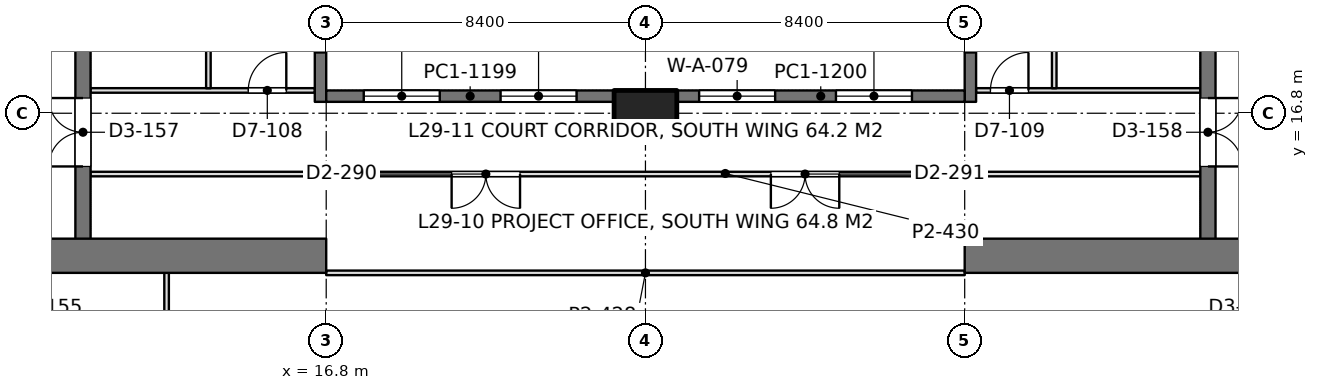
"""IFC4 building model, lengths in metres.
Left out: names, types, materials, properties, quantities, classifications, styles, units other than length and angle.
Written with IfcOpenShell. Run it as: python <this file> out.ifc"""

import sys

from ifc_helpers import new_model, si_unit, direction, frame, frame_2d, origin, origin_2d, place, context, subcontext, project, spatial, rectangle, extrude, element, fill, save


model = new_model("IFC4")
c1 = context("Model", 3, precision=1e-05, world=origin(), true_north=direction((0.0, 1.0)))
c2 = subcontext(c1, "Body", "Model", "MODEL_VIEW")
j1 = project(units=[si_unit("LENGTHUNIT", "METRE"), si_unit("PLANEANGLEUNIT", "RADIAN")], contexts=[c1])
p1 = place(None, origin())
s1 = spatial("IfcSite", under=j1, at=p1, CompositionType="ELEMENT")
p2 = place(p1, origin())
s2 = spatial("IfcBuilding", under=s1, at=p2, CompositionType="ELEMENT")
p3 = place(p2, frame((0.0, 0.0, 130.2)))
s3 = spatial("IfcBuildingStorey", under=s2, at=p3, CompositionType="ELEMENT", Elevation=130.2)
p4 = place(p3, frame((25.2, 16.8, 0.0), z_axis=(0.0, 0.0, 1.0), x_axis=(1.0, 0.0, 0.0)))
e1 = element("IfcColumn", 1, at=p4, inside=s3, PredefinedType="COLUMN", context=c2, shape_type="SweptSolid", body=[
    extrude(rectangle(XDim=1.65, YDim=1.2, at=origin_2d()), origin(), (0.0, 0.0, 1.0), 4.2),
])
p5 = place(p3, frame((-1.2, 13.05, 0.0), z_axis=(0.0, 0.0, 1.0), x_axis=(1.0, 0.0, 0.0)))
e2 = element("IfcWall", 2, at=p5, inside=s3, PredefinedType="SHEAR", context=c2, shape_type="SweptSolid", body=[
    extrude(rectangle(XDim=18.0, YDim=0.9, at=frame_2d((9.0, 0.0))), origin(), (0.0, 0.0, 1.0), 4.2),
])
p6 = place(p5, frame((8.95, 0.0, 0.0)))
e3 = element("IfcOpeningElement", 3, at=p6, cuts=e2, PredefinedType="OPENING", context=c2, shape_type="SweptSolid", body=[
    extrude(rectangle(XDim=1.8, YDim=2.4, at=frame_2d((0.9, 1.2))), frame((0.0, 0.46, 0.0), z_axis=(0.0, -1.0, 0.0), x_axis=(1.0, 0.0, 0.0)), (0.0, 0.0, 1.0), 0.92),
])
p7 = place(p3, frame((10.4, 13.05, 0.0), z_axis=(0.0, 0.0, 1.0), x_axis=(0.0, 1.0, 0.0)))
e4 = element("IfcWall", 4, at=p7, inside=s3, PredefinedType="SHEAR", context=c2, shape_type="SweptSolid", body=[
    extrude(rectangle(XDim=24.3, YDim=0.4, at=frame_2d((12.15, 0.0))), origin(), (0.0, 0.0, 1.0), 4.2),
])
p8 = place(p7, frame((10.05, 0.0, 0.0)))
e5 = element("IfcOpeningElement", 5, at=p8, cuts=e4, PredefinedType="OPENING", context=c2, shape_type="SweptSolid", body=[
    extrude(rectangle(XDim=1.1, YDim=2.2, at=frame_2d((0.55, 1.1))), frame((0.0, 0.21, 0.0), z_axis=(0.0, -1.0, 0.0), x_axis=(1.0, 0.0, 0.0)), (0.0, 0.0, 1.0), 0.42),
])
p9 = place(p7, frame((12.9, 0.0, 0.0)))
e6 = element("IfcOpeningElement", 6, at=p9, cuts=e4, PredefinedType="OPENING", context=c2, shape_type="SweptSolid", body=[
    extrude(rectangle(XDim=1.1, YDim=2.2, at=frame_2d((0.55, 1.1))), frame((0.0, 0.21, 0.0), z_axis=(0.0, -1.0, 0.0), x_axis=(1.0, 0.0, 0.0)), (0.0, 0.0, 1.0), 0.42),
])
p10 = place(p7, frame((21.45, 0.0, 0.0)))
e7 = element("IfcOpeningElement", 7, at=p10, cuts=e4, PredefinedType="OPENING", context=c2, shape_type="SweptSolid", body=[
    extrude(rectangle(XDim=1.1, YDim=2.2, at=frame_2d((0.55, 1.1))), frame((0.0, 0.21, 0.0), z_axis=(0.0, -1.0, 0.0), x_axis=(1.0, 0.0, 0.0)), (0.0, 0.0, 1.0), 0.42),
])
p11 = place(p7, frame((2.35, 0.0, 0.0)))
e8 = element("IfcOpeningElement", 8, at=p11, cuts=e4, PredefinedType="OPENING", context=c2, shape_type="SweptSolid", body=[
    extrude(rectangle(XDim=1.8, YDim=2.4, at=frame_2d((0.9, 1.2))), frame((0.0, 0.21, 0.0), z_axis=(0.0, -1.0, 0.0), x_axis=(1.0, 0.0, 0.0)), (0.0, 0.0, 1.0), 0.42),
])
p12 = place(p7, frame((5.8, 0.0, 0.0)))
e9 = element("IfcOpeningElement", 9, at=p12, cuts=e4, PredefinedType="OPENING", context=c2, shape_type="SweptSolid", body=[
    extrude(rectangle(XDim=1.8, YDim=2.4, at=frame_2d((0.9, 1.2))), frame((0.0, 0.21, 0.0), z_axis=(0.0, -1.0, 0.0), x_axis=(1.0, 0.0, 0.0)), (0.0, 0.0, 1.0), 0.42),
])
p13 = place(p3, frame((33.6, 13.05, 0.0), z_axis=(0.0, 0.0, 1.0), x_axis=(1.0, 0.0, 0.0)))
e10 = element("IfcWall", 10, at=p13, inside=s3, PredefinedType="SHEAR", context=c2, shape_type="SweptSolid", body=[
    extrude(rectangle(XDim=18.0, YDim=0.9, at=frame_2d((9.0, 0.0))), origin(), (0.0, 0.0, 1.0), 4.2),
])
p14 = place(p13, frame((7.25, 0.0, 0.0)))
e11 = element("IfcOpeningElement", 11, at=p14, cuts=e10, PredefinedType="OPENING", context=c2, shape_type="SweptSolid", body=[
    extrude(rectangle(XDim=1.8, YDim=2.4, at=frame_2d((0.9, 1.2))), frame((0.0, 0.46, 0.0), z_axis=(0.0, -1.0, 0.0), x_axis=(1.0, 0.0, 0.0)), (0.0, 0.0, 1.0), 0.92),
])
p15 = place(p3, frame((40.0, 13.05, 0.0), z_axis=(0.0, 0.0, 1.0), x_axis=(0.0, 1.0, 0.0)))
e12 = element("IfcWall", 12, at=p15, inside=s3, PredefinedType="SHEAR", context=c2, shape_type="SweptSolid", body=[
    extrude(rectangle(XDim=24.3, YDim=0.4, at=frame_2d((12.15, 0.0))), origin(), (0.0, 0.0, 1.0), 4.2),
])
p16 = place(p15, frame((10.05, 0.0, 0.0)))
e13 = element("IfcOpeningElement", 13, at=p16, cuts=e12, PredefinedType="OPENING", context=c2, shape_type="SweptSolid", body=[
    extrude(rectangle(XDim=1.1, YDim=2.2, at=frame_2d((0.55, 1.1))), frame((0.0, 0.21, 0.0), z_axis=(0.0, -1.0, 0.0), x_axis=(1.0, 0.0, 0.0)), (0.0, 0.0, 1.0), 0.42),
])
p17 = place(p15, frame((12.9, 0.0, 0.0)))
e14 = element("IfcOpeningElement", 14, at=p17, cuts=e12, PredefinedType="OPENING", context=c2, shape_type="SweptSolid", body=[
    extrude(rectangle(XDim=1.1, YDim=2.2, at=frame_2d((0.55, 1.1))), frame((0.0, 0.21, 0.0), z_axis=(0.0, -1.0, 0.0), x_axis=(1.0, 0.0, 0.0)), (0.0, 0.0, 1.0), 0.42),
])
p18 = place(p15, frame((21.45, 0.0, 0.0)))
e15 = element("IfcOpeningElement", 15, at=p18, cuts=e12, PredefinedType="OPENING", context=c2, shape_type="SweptSolid", body=[
    extrude(rectangle(XDim=1.1, YDim=2.2, at=frame_2d((0.55, 1.1))), frame((0.0, 0.21, 0.0), z_axis=(0.0, -1.0, 0.0), x_axis=(1.0, 0.0, 0.0)), (0.0, 0.0, 1.0), 0.42),
])
p19 = place(p15, frame((2.35, 0.0, 0.0)))
e16 = element("IfcOpeningElement", 16, at=p19, cuts=e12, PredefinedType="OPENING", context=c2, shape_type="SweptSolid", body=[
    extrude(rectangle(XDim=1.8, YDim=2.4, at=frame_2d((0.9, 1.2))), frame((0.0, 0.21, 0.0), z_axis=(0.0, -1.0, 0.0), x_axis=(1.0, 0.0, 0.0)), (0.0, 0.0, 1.0), 0.42),
])
p20 = place(p15, frame((5.8, 0.0, 0.0)))
e17 = element("IfcOpeningElement", 17, at=p20, cuts=e12, PredefinedType="OPENING", context=c2, shape_type="SweptSolid", body=[
    extrude(rectangle(XDim=1.8, YDim=2.4, at=frame_2d((0.9, 1.2))), frame((0.0, 0.21, 0.0), z_axis=(0.0, -1.0, 0.0), x_axis=(1.0, 0.0, 0.0)), (0.0, 0.0, 1.0), 0.42),
])
p21 = place(p3, frame((16.65, 17.1, 0.0), z_axis=(0.0, 0.0, 1.0), x_axis=(0.0, 1.0, 0.0)))
e18 = element("IfcWall", 18, at=p21, inside=s3, PredefinedType="SOLIDWALL", context=c2, shape_type="SweptSolid", body=[
    extrude(rectangle(XDim=5.0, YDim=0.3, at=frame_2d((2.5, 0.0))), origin(), (0.0, 0.0, 1.0), 4.05),
])
p22 = place(p21, frame((1.3, 0.0, 0.1)))
e19 = element("IfcOpeningElement", 19, at=p22, cuts=e18, PredefinedType="OPENING", context=c2, shape_type="SweptSolid", body=[
    extrude(rectangle(XDim=2.0, YDim=3.0, at=frame_2d((1.0, 1.5))), frame((0.0, 0.16, 0.0), z_axis=(0.0, -1.0, 0.0), x_axis=(1.0, 0.0, 0.0)), (0.0, 0.0, 1.0), 0.32),
])
p23 = place(p3, frame((33.75, 17.1, 0.0), z_axis=(0.0, 0.0, 1.0), x_axis=(0.0, 1.0, 0.0)))
e20 = element("IfcWall", 20, at=p23, inside=s3, PredefinedType="SOLIDWALL", context=c2, shape_type="SweptSolid", body=[
    extrude(rectangle(XDim=5.0, YDim=0.3, at=frame_2d((2.5, 0.0))), origin(), (0.0, 0.0, 1.0), 4.05),
])
p24 = place(p23, frame((1.3, 0.0, 0.1)))
e21 = element("IfcOpeningElement", 21, at=p24, cuts=e20, PredefinedType="OPENING", context=c2, shape_type="SweptSolid", body=[
    extrude(rectangle(XDim=2.0, YDim=3.0, at=frame_2d((1.0, 1.5))), frame((0.0, 0.16, 0.0), z_axis=(0.0, -1.0, 0.0), x_axis=(1.0, 0.0, 0.0)), (0.0, 0.0, 1.0), 0.32),
])
p25 = place(p3, frame((16.8, 17.25, 0.0), z_axis=(0.0, 0.0, 1.0), x_axis=(1.0, 0.0, 0.0)))
e22 = element("IfcWall", 22, at=p25, inside=s3, PredefinedType="SOLIDWALL", context=c2, shape_type="SweptSolid", body=[
    extrude(rectangle(XDim=7.575, YDim=0.3, at=frame_2d((3.788, 0.0))), origin(), (0.0, 0.0, 1.0), 4.05),
])
p26 = place(p25, frame((0.988, 0.0, 0.1)))
e23 = element("IfcOpeningElement", 23, at=p26, cuts=e22, PredefinedType="OPENING", context=c2, shape_type="SweptSolid", body=[
    extrude(rectangle(XDim=2.0, YDim=3.0, at=frame_2d((1.0, 1.5))), frame((0.0, 0.16, 0.0), z_axis=(0.0, -1.0, 0.0), x_axis=(1.0, 0.0, 0.0)), (0.0, 0.0, 1.0), 0.32),
])
p27 = place(p25, frame((4.587, 0.0, 0.1)))
e24 = element("IfcOpeningElement", 24, at=p27, cuts=e22, PredefinedType="OPENING", context=c2, shape_type="SweptSolid", body=[
    extrude(rectangle(XDim=2.0, YDim=3.0, at=frame_2d((1.0, 1.5))), frame((0.0, 0.16, 0.0), z_axis=(0.0, -1.0, 0.0), x_axis=(1.0, 0.0, 0.0)), (0.0, 0.0, 1.0), 0.32),
])
p28 = place(p3, frame((26.025, 17.25, 0.0), z_axis=(0.0, 0.0, 1.0), x_axis=(1.0, 0.0, 0.0)))
e25 = element("IfcWall", 25, at=p28, inside=s3, PredefinedType="SOLIDWALL", context=c2, shape_type="SweptSolid", body=[
    extrude(rectangle(XDim=7.575, YDim=0.3, at=frame_2d((3.788, 0.0))), origin(), (0.0, 0.0, 1.0), 4.05),
])
p29 = place(p28, frame((0.587, 0.0, 0.1)))
e26 = element("IfcOpeningElement", 26, at=p29, cuts=e25, PredefinedType="OPENING", context=c2, shape_type="SweptSolid", body=[
    extrude(rectangle(XDim=2.0, YDim=3.0, at=frame_2d((1.0, 1.5))), frame((0.0, 0.16, 0.0), z_axis=(0.0, -1.0, 0.0), x_axis=(1.0, 0.0, 0.0)), (0.0, 0.0, 1.0), 0.32),
])
p30 = place(p28, frame((4.188, 0.0, 0.1)))
e27 = element("IfcOpeningElement", 27, at=p30, cuts=e25, PredefinedType="OPENING", context=c2, shape_type="SweptSolid", body=[
    extrude(rectangle(XDim=2.0, YDim=3.0, at=frame_2d((1.0, 1.5))), frame((0.0, 0.16, 0.0), z_axis=(0.0, -1.0, 0.0), x_axis=(1.0, 0.0, 0.0)), (0.0, 0.0, 1.0), 0.32),
])
p31 = place(p3, frame((10.598, 17.4, 0.0), z_axis=(0.0, 0.0, 1.0), x_axis=(1.0, 0.0, 0.0)))
e28 = element("IfcWall", 28, at=p31, inside=s3, PredefinedType="PARTITIONING", context=c2, shape_type="SweptSolid", body=[
    extrude(rectangle(XDim=5.904, YDim=0.12, at=frame_2d((2.952, 0.0))), origin(), (0.0, 0.0, 1.0), 3.55),
])
p32 = place(p31, frame((4.152, 0.0, 0.0)))
e29 = element("IfcOpeningElement", 29, at=p32, cuts=e28, PredefinedType="OPENING", context=c2, shape_type="SweptSolid", body=[
    extrude(rectangle(XDim=1.0, YDim=2.4, at=frame_2d((0.5, 1.2))), frame((0.0, 0.07, 0.0), z_axis=(0.0, -1.0, 0.0), x_axis=(1.0, 0.0, 0.0)), (0.0, 0.0, 1.0), 0.14),
])
p33 = place(p3, frame((13.7, 17.458, 0.0), z_axis=(0.0, 0.0, 1.0), x_axis=(0.0, 1.0, 0.0)))
e30 = element("IfcWall", 30, at=p33, inside=s3, PredefinedType="PARTITIONING", context=c2, shape_type="SweptSolid", body=[
    extrude(rectangle(XDim=4.644, YDim=0.12, at=frame_2d((2.322, 0.0))), origin(), (0.0, 0.0, 1.0), 3.6),
])
p34 = place(p3, frame((33.898, 17.4, 0.0), z_axis=(0.0, 0.0, 1.0), x_axis=(1.0, 0.0, 0.0)))
e31 = element("IfcWall", 31, at=p34, inside=s3, PredefinedType="PARTITIONING", context=c2, shape_type="SweptSolid", body=[
    extrude(rectangle(XDim=5.904, YDim=0.12, at=frame_2d((2.952, 0.0))), origin(), (0.0, 0.0, 1.0), 3.55),
])
p35 = place(p34, frame((0.38, 0.0, 0.0)))
e32 = element("IfcOpeningElement", 32, at=p35, cuts=e31, PredefinedType="OPENING", context=c2, shape_type="SweptSolid", body=[
    extrude(rectangle(XDim=1.0, YDim=2.4, at=frame_2d((0.5, 1.2))), frame((0.0, 0.07, 0.0), z_axis=(0.0, -1.0, 0.0), x_axis=(1.0, 0.0, 0.0)), (0.0, 0.0, 1.0), 0.14),
])
p36 = place(p3, frame((35.956, 17.458, 0.0), z_axis=(0.0, 0.0, 1.0), x_axis=(0.0, 1.0, 0.0)))
e33 = element("IfcWall", 33, at=p36, inside=s3, PredefinedType="PARTITIONING", context=c2, shape_type="SweptSolid", body=[
    extrude(rectangle(XDim=4.644, YDim=0.12, at=frame_2d((2.322, 0.0))), origin(), (0.0, 0.0, 1.0), 3.6),
])
p37 = place(p3, frame((12.6, 1.898, 0.0), z_axis=(0.0, 0.0, 1.0), x_axis=(0.0, 1.0, 0.0)))
e34 = element("IfcWall", 34, at=p37, inside=s3, PredefinedType="PARTITIONING", context=c2, shape_type="SweptSolid", body=[
    extrude(rectangle(XDim=10.704, YDim=0.12, at=frame_2d((5.352, 0.0))), origin(), (0.0, 0.0, 1.0), 3.55),
])
for number, where, z_axis, x_axis in (
    (35, (10.598, 15.2, 0.0), (0.0, 0.0, 1.0), (1.0, 0.0, 0.0)),
    (36, (33.598, 15.2, 0.0), (0.0, 0.0, 1.0), (1.0, 0.0, 0.0)),
):
    element("IfcWall", number, at=place(p3, frame(where, z_axis=z_axis, x_axis=x_axis)), inside=s3, PredefinedType="PARTITIONING", context=c2, shape_type="SweptSolid", body=[
        extrude(rectangle(XDim=6.204, YDim=0.12, at=frame_2d((3.102, 0.0))), origin(), (0.0, 0.0, 1.0), 3.55),
    ])
p38 = place(p3, frame((16.798, 15.2, 0.0), z_axis=(0.0, 0.0, 1.0), x_axis=(1.0, 0.0, 0.0)))
e37 = element("IfcWall", 37, at=p38, inside=s3, PredefinedType="PARTITIONING", context=c2, shape_type="SweptSolid", body=[
    extrude(rectangle(XDim=16.804, YDim=0.12, at=frame_2d((8.402, 0.0))), origin(), (0.0, 0.0, 1.0), 3.55),
])
p39 = place(p38, frame((3.302, 0.0, 0.0)))
e38 = element("IfcOpeningElement", 38, at=p39, cuts=e37, PredefinedType="OPENING", context=c2, shape_type="SweptSolid", body=[
    extrude(rectangle(XDim=1.8, YDim=2.2, at=frame_2d((0.9, 1.1))), frame((0.0, 0.07, 0.0), z_axis=(0.0, -1.0, 0.0), x_axis=(1.0, 0.0, 0.0)), (0.0, 0.0, 1.0), 0.14),
])
p40 = place(p38, frame((11.702, 0.0, 0.0)))
e39 = element("IfcOpeningElement", 39, at=p40, cuts=e37, PredefinedType="OPENING", context=c2, shape_type="SweptSolid", body=[
    extrude(rectangle(XDim=1.8, YDim=2.2, at=frame_2d((0.9, 1.1))), frame((0.0, 0.07, 0.0), z_axis=(0.0, -1.0, 0.0), x_axis=(1.0, 0.0, 0.0)), (0.0, 0.0, 1.0), 0.14),
])
p41 = place(p3, frame((16.8, 12.6, 0.0), z_axis=(0.0, 0.0, 1.0), x_axis=(1.0, 0.0, 0.0)))
e40 = element("IfcWall", 40, at=p41, inside=s3, PredefinedType="PARTITIONING", context=c2, shape_type="SweptSolid", body=[
    extrude(rectangle(XDim=16.8, YDim=0.12, at=frame_2d((8.4, 0.0))), origin(), (0.0, 0.0, 1.0), 3.55),
])
p42 = place(p26, origin())
e41 = element("IfcWindow", 41, at=p42, inside=s3, PartitioningType="SINGLE_PANEL", PredefinedType="WINDOW", context=c2, shape_type="SweptSolid", body=[
    extrude(rectangle(XDim=2.0, YDim=3.0, at=frame_2d((1.0, 1.5))), frame((0.0, 0.03, 0.0), z_axis=(0.0, -1.0, 0.0), x_axis=(1.0, 0.0, 0.0)), (0.0, 0.0, 1.0), 0.06),
])
fill(e23, e41)
p43 = place(p27, origin())
e42 = element("IfcWindow", 42, at=p43, inside=s3, PartitioningType="SINGLE_PANEL", PredefinedType="WINDOW", context=c2, shape_type="SweptSolid", body=[
    extrude(rectangle(XDim=2.0, YDim=3.0, at=frame_2d((1.0, 1.5))), frame((0.0, 0.03, 0.0), z_axis=(0.0, -1.0, 0.0), x_axis=(1.0, 0.0, 0.0)), (0.0, 0.0, 1.0), 0.06),
])
fill(e24, e42)
p44 = place(p29, origin())
e43 = element("IfcWindow", 43, at=p44, inside=s3, PartitioningType="SINGLE_PANEL", PredefinedType="WINDOW", context=c2, shape_type="SweptSolid", body=[
    extrude(rectangle(XDim=2.0, YDim=3.0, at=frame_2d((1.0, 1.5))), frame((0.0, 0.03, 0.0), z_axis=(0.0, -1.0, 0.0), x_axis=(1.0, 0.0, 0.0)), (0.0, 0.0, 1.0), 0.06),
])
fill(e26, e43)
p45 = place(p30, origin())
e44 = element("IfcWindow", 44, at=p45, inside=s3, PartitioningType="SINGLE_PANEL", PredefinedType="WINDOW", context=c2, shape_type="SweptSolid", body=[
    extrude(rectangle(XDim=2.0, YDim=3.0, at=frame_2d((1.0, 1.5))), frame((0.0, 0.03, 0.0), z_axis=(0.0, -1.0, 0.0), x_axis=(1.0, 0.0, 0.0)), (0.0, 0.0, 1.0), 0.06),
])
fill(e27, e44)
p46 = place(p11, origin())
e45 = element("IfcDoor", 45, at=p46, inside=s3, OperationType="DOUBLE_DOOR_SINGLE_SWING", PredefinedType="DOOR", context=c2, shape_type="SweptSolid", body=[
    extrude(rectangle(XDim=1.8, YDim=2.4, at=frame_2d((0.9, 1.2))), frame((0.0, 0.025, 0.0), z_axis=(0.0, -1.0, 0.0), x_axis=(1.0, 0.0, 0.0)), (0.0, 0.0, 1.0), 0.05),
])
fill(e8, e45)
p47 = place(p19, frame((1.8, 0.0, 0.0), z_axis=(0.0, 0.0, 1.0), x_axis=(-1.0, 0.0, 0.0)))
e46 = element("IfcDoor", 46, at=p47, inside=s3, OperationType="DOUBLE_DOOR_SINGLE_SWING", PredefinedType="DOOR", context=c2, shape_type="SweptSolid", body=[
    extrude(rectangle(XDim=1.8, YDim=2.4, at=frame_2d((0.9, 1.2))), frame((0.0, 0.025, 0.0), z_axis=(0.0, -1.0, 0.0), x_axis=(1.0, 0.0, 0.0)), (0.0, 0.0, 1.0), 0.05),
])
fill(e16, e46)
p48 = place(p32, origin())
e47 = element("IfcDoor", 47, at=p48, inside=s3, OperationType="SINGLE_SWING_RIGHT", PredefinedType="DOOR", context=c2, shape_type="SweptSolid", body=[
    extrude(rectangle(XDim=1.0, YDim=2.4, at=frame_2d((0.5, 1.2))), frame((0.0, 0.025, 0.0), z_axis=(0.0, -1.0, 0.0), x_axis=(1.0, 0.0, 0.0)), (0.0, 0.0, 1.0), 0.05),
])
fill(e29, e47)
p49 = place(p35, origin())
e48 = element("IfcDoor", 48, at=p49, inside=s3, OperationType="SINGLE_SWING_RIGHT", PredefinedType="DOOR", context=c2, shape_type="SweptSolid", body=[
    extrude(rectangle(XDim=1.0, YDim=2.4, at=frame_2d((0.5, 1.2))), frame((0.0, 0.025, 0.0), z_axis=(0.0, -1.0, 0.0), x_axis=(1.0, 0.0, 0.0)), (0.0, 0.0, 1.0), 0.05),
])
fill(e32, e48)
p50 = place(p39, frame((1.8, 0.0, 0.0), z_axis=(0.0, 0.0, 1.0), x_axis=(-1.0, 0.0, 0.0)))
e49 = element("IfcDoor", 49, at=p50, inside=s3, OperationType="DOUBLE_DOOR_SINGLE_SWING", PredefinedType="DOOR", context=c2, shape_type="SweptSolid", body=[
    extrude(rectangle(XDim=1.8, YDim=2.2, at=frame_2d((0.9, 1.1))), frame((0.0, 0.025, 0.0), z_axis=(0.0, -1.0, 0.0), x_axis=(1.0, 0.0, 0.0)), (0.0, 0.0, 1.0), 0.05),
])
fill(e38, e49)
p51 = place(p40, frame((1.8, 0.0, 0.0), z_axis=(0.0, 0.0, 1.0), x_axis=(-1.0, 0.0, 0.0)))
e50 = element("IfcDoor", 50, at=p51, inside=s3, OperationType="DOUBLE_DOOR_SINGLE_SWING", PredefinedType="DOOR", context=c2, shape_type="SweptSolid", body=[
    extrude(rectangle(XDim=1.8, YDim=2.2, at=frame_2d((0.9, 1.1))), frame((0.0, 0.025, 0.0), z_axis=(0.0, -1.0, 0.0), x_axis=(1.0, 0.0, 0.0)), (0.0, 0.0, 1.0), 0.05),
])
fill(e39, e50)
save(model, sys.argv[1])
